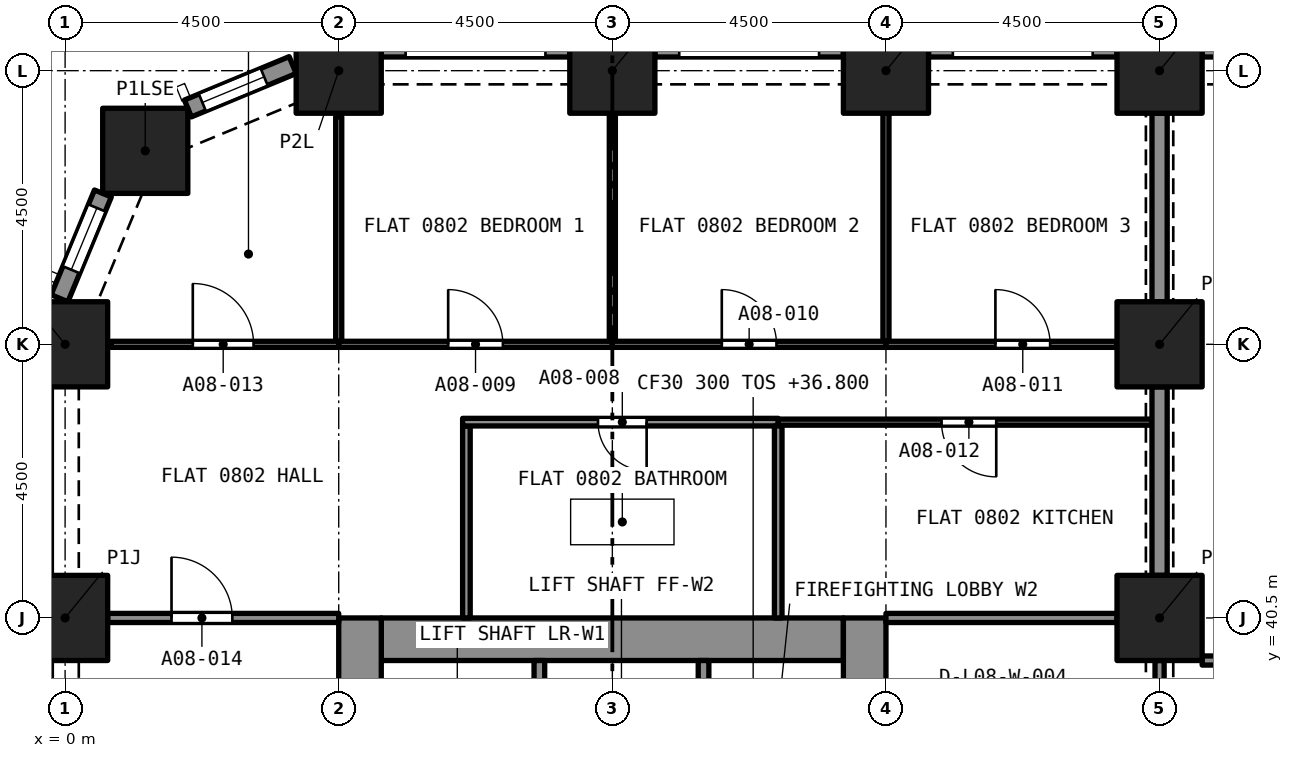
"""IFC4 building model, lengths in metres.
Left out: names, types, materials, properties, quantities, classifications, styles, units other than length and angle.
Written with IfcOpenShell. Run it as: python <this file> out.ifc"""

import sys

from ifc_helpers import new_model, si_unit, direction, frame, frame_2d, origin, origin_2d, place, context, subcontext, project, spatial, rectangle, extrude, element, fill, save


model = new_model("IFC4")
c1 = context("Model", 3, precision=1e-05, world=origin(), true_north=direction((0.0, 1.0)))
c2 = subcontext(c1, "Body", "Model", "MODEL_VIEW")
j1 = project(units=[si_unit("LENGTHUNIT", "METRE"), si_unit("PLANEANGLEUNIT", "RADIAN")], contexts=[c1])
p1 = place(None, origin())
s1 = spatial("IfcSite", under=j1, at=p1, CompositionType="ELEMENT")
p2 = place(p1, origin())
s2 = spatial("IfcBuilding", under=s1, at=p2, CompositionType="ELEMENT")
p3 = place(p2, frame((0.0, 0.0, 36.8)))
s3 = spatial("IfcBuildingStorey", under=s2, at=p3, CompositionType="ELEMENT", Elevation=36.8)
for number, where, z_axis, x_axis in (
    (1, (0.0, 40.5, 0.0), (0.0, 0.0, 1.0), (1.0, 0.0, 0.0)),
    (2, (18.0, 40.5, 0.0), (0.0, 0.0, 1.0), (1.0, 0.0, 0.0)),
    (3, (0.0, 45.0, 0.0), (0.0, 0.0, 1.0), (1.0, 0.0, 0.0)),
    (4, (18.0, 45.0, 0.0), (0.0, 0.0, 1.0), (1.0, 0.0, 0.0)),
    (5, (1.318, 48.182, 0.0), (0.0, 0.0, 1.0), (1.0, 0.0, 0.0)),
    (6, (4.5, 49.5, 0.0), (0.0, 0.0, 1.0), (1.0, 0.0, 0.0)),
    (7, (9.0, 49.5, 0.0), (0.0, 0.0, 1.0), (1.0, 0.0, 0.0)),
    (8, (13.5, 49.5, 0.0), (0.0, 0.0, 1.0), (1.0, 0.0, 0.0)),
    (9, (18.0, 49.5, 0.0), (0.0, 0.0, 1.0), (1.0, 0.0, 0.0)),
):
    element("IfcColumn", number, at=place(p3, frame(where, z_axis=z_axis, x_axis=x_axis)), inside=s3, PredefinedType="COLUMN", context=c2, shape_type="SweptSolid", body=[
        extrude(rectangle(XDim=1.4, YDim=1.4, at=origin_2d()), origin(), (0.0, 0.0, 1.0), 3.2),
    ])
p4 = place(p3, frame((5.2, 40.15, 0.0), z_axis=(0.0, 0.0, 1.0), x_axis=(1.0, 0.0, 0.0)))
e10 = element("IfcWall", 10, at=p4, inside=s3, PredefinedType="SOLIDWALL", context=c2, shape_type="SweptSolid", body=[
    extrude(rectangle(XDim=7.6, YDim=0.7, at=frame_2d((3.8, 0.0))), origin(), (0.0, 0.0, 1.0), 3.2),
])
p5 = place(p3, frame((4.85, 27.0, 0.0), z_axis=(0.0, 0.0, 1.0), x_axis=(0.0, 1.0, 0.0)))
e11 = element("IfcWall", 11, at=p5, inside=s3, PredefinedType="SOLIDWALL", context=c2, shape_type="SweptSolid", body=[
    extrude(rectangle(XDim=13.5, YDim=0.7, at=frame_2d((6.75, 0.0))), origin(), (0.0, 0.0, 1.0), 3.2),
])
p6 = place(p5, frame((8.95, 0.0, 0.0)))
e12 = element("IfcOpeningElement", 12, at=p6, cuts=e11, PredefinedType="OPENING", context=c2, shape_type="SweptSolid", body=[
    extrude(rectangle(XDim=1.2, YDim=2.1, at=frame_2d((0.6, 1.05))), frame((0.0, 0.36, 0.0), z_axis=(0.0, -1.0, 0.0), x_axis=(1.0, 0.0, 0.0)), (0.0, 0.0, 1.0), 0.72),
])
p7 = place(p3, frame((13.15, 27.0, 0.0), z_axis=(0.0, 0.0, 1.0), x_axis=(0.0, 1.0, 0.0)))
e13 = element("IfcWall", 13, at=p7, inside=s3, PredefinedType="SOLIDWALL", context=c2, shape_type="SweptSolid", body=[
    extrude(rectangle(XDim=13.5, YDim=0.7, at=frame_2d((6.75, 0.0))), origin(), (0.0, 0.0, 1.0), 3.2),
])
p8 = place(p7, frame((11.1, 0.0, 0.0)))
e14 = element("IfcOpeningElement", 14, at=p8, cuts=e13, PredefinedType="OPENING", context=c2, shape_type="SweptSolid", body=[
    extrude(rectangle(XDim=1.1, YDim=2.1, at=frame_2d((0.55, 1.05))), frame((0.0, 0.36, 0.0), z_axis=(0.0, -1.0, 0.0), x_axis=(1.0, 0.0, 0.0)), (0.0, 0.0, 1.0), 0.72),
])
p9 = place(p7, frame((8.95, 0.0, 0.0)))
e15 = element("IfcOpeningElement", 15, at=p9, cuts=e13, PredefinedType="OPENING", context=c2, shape_type="SweptSolid", body=[
    extrude(rectangle(XDim=1.2, YDim=2.1, at=frame_2d((0.6, 1.05))), frame((0.0, 0.36, 0.0), z_axis=(0.0, -1.0, 0.0), x_axis=(1.0, 0.0, 0.0)), (0.0, 0.0, 1.0), 0.72),
])
p10 = place(p3, frame((18.7, 49.875, 0.0), z_axis=(0.0, 0.0, 1.0), x_axis=(1.0, 0.0, 0.0)))
e16 = element("IfcWall", 16, at=p10, inside=s3, PredefinedType="SOLIDWALL", context=c2, shape_type="SweptSolid", body=[
    extrude(rectangle(XDim=3.1, YDim=0.3, at=frame_2d((1.55, 0.0))), origin(), (0.0, 0.0, 1.0), 3.2),
])
p11 = place(p10, frame((0.4, 0.0, 0.45)))
e17 = element("IfcOpeningElement", 17, at=p11, cuts=e16, PredefinedType="OPENING", context=c2, shape_type="SweptSolid", body=[
    extrude(rectangle(XDim=2.3, YDim=1.95, at=frame_2d((1.15, 0.975))), frame((0.0, 0.16, 0.0), z_axis=(0.0, -1.0, 0.0), x_axis=(1.0, 0.0, 0.0)), (0.0, 0.0, 1.0), 0.32),
])
p12 = place(p3, frame((14.2, 49.875, 0.0), z_axis=(0.0, 0.0, 1.0), x_axis=(1.0, 0.0, 0.0)))
e18 = element("IfcWall", 18, at=p12, inside=s3, PredefinedType="SOLIDWALL", context=c2, shape_type="SweptSolid", body=[
    extrude(rectangle(XDim=3.1, YDim=0.3, at=frame_2d((1.55, 0.0))), origin(), (0.0, 0.0, 1.0), 3.2),
])
p13 = place(p12, frame((0.4, 0.0, 0.45)))
e19 = element("IfcOpeningElement", 19, at=p13, cuts=e18, PredefinedType="OPENING", context=c2, shape_type="SweptSolid", body=[
    extrude(rectangle(XDim=2.3, YDim=1.95, at=frame_2d((1.15, 0.975))), frame((0.0, 0.16, 0.0), z_axis=(0.0, -1.0, 0.0), x_axis=(1.0, 0.0, 0.0)), (0.0, 0.0, 1.0), 0.32),
])
p14 = place(p3, frame((9.7, 49.875, 0.0), z_axis=(0.0, 0.0, 1.0), x_axis=(1.0, 0.0, 0.0)))
e20 = element("IfcWall", 20, at=p14, inside=s3, PredefinedType="SOLIDWALL", context=c2, shape_type="SweptSolid", body=[
    extrude(rectangle(XDim=3.1, YDim=0.3, at=frame_2d((1.55, 0.0))), origin(), (0.0, 0.0, 1.0), 3.2),
])
p15 = place(p14, frame((0.4, 0.0, 0.45)))
e21 = element("IfcOpeningElement", 21, at=p15, cuts=e20, PredefinedType="OPENING", context=c2, shape_type="SweptSolid", body=[
    extrude(rectangle(XDim=2.3, YDim=1.95, at=frame_2d((1.15, 0.975))), frame((0.0, 0.16, 0.0), z_axis=(0.0, -1.0, 0.0), x_axis=(1.0, 0.0, 0.0)), (0.0, 0.0, 1.0), 0.32),
])
p16 = place(p3, frame((5.2, 49.875, 0.0), z_axis=(0.0, 0.0, 1.0), x_axis=(1.0, 0.0, 0.0)))
e22 = element("IfcWall", 22, at=p16, inside=s3, PredefinedType="SOLIDWALL", context=c2, shape_type="SweptSolid", body=[
    extrude(rectangle(XDim=3.1, YDim=0.3, at=frame_2d((1.55, 0.0))), origin(), (0.0, 0.0, 1.0), 3.2),
])
p17 = place(p16, frame((0.4, 0.0, 0.45)))
e23 = element("IfcOpeningElement", 23, at=p17, cuts=e22, PredefinedType="OPENING", context=c2, shape_type="SweptSolid", body=[
    extrude(rectangle(XDim=2.3, YDim=1.95, at=frame_2d((1.15, 0.975))), frame((0.0, 0.16, 0.0), z_axis=(0.0, -1.0, 0.0), x_axis=(1.0, 0.0, 0.0)), (0.0, 0.0, 1.0), 0.32),
])
p18 = place(p3, frame((2.02, 48.878, 0.0), z_axis=(0.0, 0.0, 1.0), x_axis=(0.923903565336, 0.38262540684, 0.0)))
e24 = element("IfcWall", 24, at=p18, inside=s3, PredefinedType="SOLIDWALL", context=c2, shape_type="SweptSolid", body=[
    extrude(rectangle(XDim=1.865, YDim=0.3, at=frame_2d((0.933, 0.0))), origin(), (0.0, 0.0, 1.0), 3.2),
])
p19 = place(p18, frame((0.258, 0.0, 0.45)))
e25 = element("IfcOpeningElement", 25, at=p19, cuts=e24, PredefinedType="OPENING", context=c2, shape_type="SweptSolid", body=[
    extrude(rectangle(XDim=1.1, YDim=1.95, at=frame_2d((0.55, 0.975))), frame((0.0, 0.16, 0.0), z_axis=(0.0, -1.0, 0.0), x_axis=(1.0, 0.0, 0.0)), (0.0, 0.0, 1.0), 0.32),
])
p20 = place(p3, frame((-0.092, 45.757, 0.0), z_axis=(0.0, 0.0, 1.0), x_axis=(0.382737135771, 0.923857286003, 0.0)))
e26 = element("IfcWall", 26, at=p20, inside=s3, PredefinedType="SOLIDWALL", context=c2, shape_type="SweptSolid", body=[
    extrude(rectangle(XDim=1.865, YDim=0.3, at=frame_2d((0.933, 0.0))), origin(), (0.0, 0.0, 1.0), 3.2),
])
p21 = place(p20, frame((0.508, 0.0, 0.45)))
e27 = element("IfcOpeningElement", 27, at=p21, cuts=e26, PredefinedType="OPENING", context=c2, shape_type="SweptSolid", body=[
    extrude(rectangle(XDim=1.1, YDim=1.95, at=frame_2d((0.55, 0.975))), frame((0.0, 0.16, 0.0), z_axis=(0.0, -1.0, 0.0), x_axis=(1.0, 0.0, 0.0)), (0.0, 0.0, 1.0), 0.32),
])
p22 = place(p3, frame((6.6, 40.5, 0.0), z_axis=(0.0, 0.0, 1.0), x_axis=(0.0, 1.0, 0.0)))
e28 = element("IfcWall", 28, at=p22, inside=s3, PredefinedType="PARTITIONING", context=c2, shape_type="SweptSolid", body=[
    extrude(rectangle(XDim=3.157, YDim=0.125, at=frame_2d((1.579, 0.0))), origin(), (0.0, 0.0, 1.0), 2.9),
])
p23 = place(p3, frame((11.728, 43.72, 0.0), z_axis=(0.0, 0.0, 1.0), x_axis=(-1.0, 0.0, 0.0)))
e29 = element("IfcWall", 29, at=p23, inside=s3, PredefinedType="PARTITIONING", context=c2, shape_type="SweptSolid", body=[
    extrude(rectangle(XDim=5.19, YDim=0.125, at=frame_2d((2.595, 0.0))), origin(), (0.0, 0.0, 1.0), 2.9),
])
p24 = place(p23, frame((2.164, 0.0, 0.0)))
e30 = element("IfcOpeningElement", 30, at=p24, cuts=e29, PredefinedType="OPENING", context=c2, shape_type="SweptSolid", body=[
    extrude(rectangle(XDim=0.8, YDim=2.1, at=frame_2d((0.4, 1.05))), frame((0.0, 0.073, 0.0), z_axis=(0.0, -1.0, 0.0), x_axis=(1.0, 0.0, 0.0)), (0.0, 0.0, 1.0), 0.145),
])
p25 = place(p3, frame((11.728, 40.5, 0.0), z_axis=(0.0, 0.0, 1.0), x_axis=(0.0, 1.0, 0.0)))
e31 = element("IfcWall", 31, at=p25, inside=s3, PredefinedType="PARTITIONING", context=c2, shape_type="SweptSolid", body=[
    extrude(rectangle(XDim=3.157, YDim=0.125, at=frame_2d((1.579, 0.0))), origin(), (0.0, 0.0, 1.0), 2.9),
])
p26 = place(p3, frame((9.0, 45.05, 0.0), z_axis=(0.0, 0.0, 1.0), x_axis=(0.0, 1.0, 0.0)))
e32 = element("IfcWall", 32, at=p26, inside=s3, PredefinedType="PARTITIONING", context=c2, shape_type="SweptSolid", body=[
    extrude(rectangle(XDim=3.75, YDim=0.1, at=frame_2d((1.875, 0.0))), origin(), (0.0, 0.0, 1.0), 2.9),
])
p27 = place(p3, frame((4.5, 45.0, 0.0), z_axis=(0.0, 0.0, 1.0), x_axis=(1.0, 0.0, 0.0)))
e33 = element("IfcWall", 33, at=p27, inside=s3, PredefinedType="PARTITIONING", context=c2, shape_type="SweptSolid", body=[
    extrude(rectangle(XDim=4.5, YDim=0.1, at=frame_2d((2.25, 0.0))), origin(), (0.0, 0.0, 1.0), 2.9),
])
p28 = place(p27, frame((1.8, 0.0, 0.0)))
e34 = element("IfcOpeningElement", 34, at=p28, cuts=e33, PredefinedType="OPENING", context=c2, shape_type="SweptSolid", body=[
    extrude(rectangle(XDim=0.9, YDim=2.1, at=frame_2d((0.45, 1.05))), frame((0.0, 0.06, 0.0), z_axis=(0.0, -1.0, 0.0), x_axis=(1.0, 0.0, 0.0)), (0.0, 0.0, 1.0), 0.12),
])
p29 = place(p3, frame((4.5, 45.05, 0.0), z_axis=(0.0, 0.0, 1.0), x_axis=(0.0, 1.0, 0.0)))
e35 = element("IfcWall", 35, at=p29, inside=s3, PredefinedType="PARTITIONING", context=c2, shape_type="SweptSolid", body=[
    extrude(rectangle(XDim=3.692, YDim=0.1, at=frame_2d((1.846, 0.0))), origin(), (0.0, 0.0, 1.0), 2.9),
])
p30 = place(p3, frame((13.5, 45.05, 0.0), z_axis=(0.0, 0.0, 1.0), x_axis=(0.0, 1.0, 0.0)))
e36 = element("IfcWall", 36, at=p30, inside=s3, PredefinedType="PARTITIONING", context=c2, shape_type="SweptSolid", body=[
    extrude(rectangle(XDim=3.75, YDim=0.1, at=frame_2d((1.875, 0.0))), origin(), (0.0, 0.0, 1.0), 2.9),
])
p31 = place(p3, frame((9.0, 45.0, 0.0), z_axis=(0.0, 0.0, 1.0), x_axis=(1.0, 0.0, 0.0)))
e37 = element("IfcWall", 37, at=p31, inside=s3, PredefinedType="PARTITIONING", context=c2, shape_type="SweptSolid", body=[
    extrude(rectangle(XDim=4.5, YDim=0.1, at=frame_2d((2.25, 0.0))), origin(), (0.0, 0.0, 1.0), 2.9),
])
p32 = place(p31, frame((1.8, 0.0, 0.0)))
e38 = element("IfcOpeningElement", 38, at=p32, cuts=e37, PredefinedType="OPENING", context=c2, shape_type="SweptSolid", body=[
    extrude(rectangle(XDim=0.9, YDim=2.1, at=frame_2d((0.45, 1.05))), frame((0.0, 0.06, 0.0), z_axis=(0.0, -1.0, 0.0), x_axis=(1.0, 0.0, 0.0)), (0.0, 0.0, 1.0), 0.12),
])
p33 = place(p3, frame((13.5, 45.0, 0.0), z_axis=(0.0, 0.0, 1.0), x_axis=(1.0, 0.0, 0.0)))
e39 = element("IfcWall", 39, at=p33, inside=s3, PredefinedType="PARTITIONING", context=c2, shape_type="SweptSolid", body=[
    extrude(rectangle(XDim=3.8, YDim=0.1, at=frame_2d((1.9, 0.0))), origin(), (0.0, 0.0, 1.0), 2.9),
])
p34 = place(p33, frame((1.8, 0.0, 0.0)))
e40 = element("IfcOpeningElement", 40, at=p34, cuts=e39, PredefinedType="OPENING", context=c2, shape_type="SweptSolid", body=[
    extrude(rectangle(XDim=0.9, YDim=2.1, at=frame_2d((0.45, 1.05))), frame((0.0, 0.06, 0.0), z_axis=(0.0, -1.0, 0.0), x_axis=(1.0, 0.0, 0.0)), (0.0, 0.0, 1.0), 0.12),
])
p35 = place(p3, frame((18.0, 45.7, 0.0), z_axis=(0.0, 0.0, 1.0), x_axis=(0.0, 1.0, 0.0)))
e41 = element("IfcWall", 41, at=p35, inside=s3, PredefinedType="PARTITIONING", context=c2, shape_type="SweptSolid", body=[
    extrude(rectangle(XDim=3.1, YDim=0.25, at=frame_2d((1.55, 0.0))), origin(), (0.0, 0.0, 1.0), 2.38),
])
p36 = place(p3, frame((17.875, 43.72, 0.0), z_axis=(0.0, 0.0, 1.0), x_axis=(-1.0, 0.0, 0.0)))
e42 = element("IfcWall", 42, at=p36, inside=s3, PredefinedType="PARTITIONING", context=c2, shape_type="SweptSolid", body=[
    extrude(rectangle(XDim=6.147, YDim=0.1, at=frame_2d((3.073, 0.0))), origin(), (0.0, 0.0, 1.0), 2.9),
])
p37 = place(p36, frame((2.561, 0.0, 0.0)))
e43 = element("IfcOpeningElement", 43, at=p37, cuts=e42, PredefinedType="OPENING", context=c2, shape_type="SweptSolid", body=[
    extrude(rectangle(XDim=0.9, YDim=2.1, at=frame_2d((0.45, 1.05))), frame((0.0, 0.06, 0.0), z_axis=(0.0, -1.0, 0.0), x_axis=(1.0, 0.0, 0.0)), (0.0, 0.0, 1.0), 0.12),
])
p38 = place(p3, frame((0.758, 45.0, 0.0), z_axis=(0.0, 0.0, 1.0), x_axis=(1.0, 0.0, 0.0)))
e44 = element("IfcWall", 44, at=p38, inside=s3, PredefinedType="PARTITIONING", context=c2, shape_type="SweptSolid", body=[
    extrude(rectangle(XDim=3.742, YDim=0.1, at=frame_2d((1.871, 0.0))), origin(), (0.0, 0.0, 1.0), 2.9),
])
p39 = place(p38, frame((1.342, 0.0, 0.0)))
e45 = element("IfcOpeningElement", 45, at=p39, cuts=e44, PredefinedType="OPENING", context=c2, shape_type="SweptSolid", body=[
    extrude(rectangle(XDim=1.0, YDim=2.1, at=frame_2d((0.5, 1.05))), frame((0.0, 0.06, 0.0), z_axis=(0.0, -1.0, 0.0), x_axis=(1.0, 0.0, 0.0)), (0.0, 0.0, 1.0), 0.12),
])
p40 = place(p3, frame((0.7, 40.5, 0.0), z_axis=(0.0, 0.0, 1.0), x_axis=(1.0, 0.0, 0.0)))
e46 = element("IfcWall", 46, at=p40, inside=s3, PredefinedType="PARTITIONING", context=c2, shape_type="SweptSolid", body=[
    extrude(rectangle(XDim=3.8, YDim=0.15, at=frame_2d((1.9, 0.0))), origin(), (0.0, 0.0, 1.0), 2.9),
])
p41 = place(p40, frame((1.05, 0.0, 0.0)))
e47 = element("IfcOpeningElement", 47, at=p41, cuts=e46, PredefinedType="OPENING", context=c2, shape_type="SweptSolid", body=[
    extrude(rectangle(XDim=1.0, YDim=2.1, at=frame_2d((0.5, 1.05))), frame((0.0, 0.085, 0.0), z_axis=(0.0, -1.0, 0.0), x_axis=(1.0, 0.0, 0.0)), (0.0, 0.0, 1.0), 0.17),
])
p42 = place(p3, frame((18.0, 41.2, 0.0), z_axis=(0.0, 0.0, 1.0), x_axis=(0.0, 1.0, 0.0)))
e48 = element("IfcWall", 48, at=p42, inside=s3, PredefinedType="PARTITIONING", context=c2, shape_type="SweptSolid", body=[
    extrude(rectangle(XDim=3.1, YDim=0.25, at=frame_2d((1.55, 0.0))), origin(), (0.0, 0.0, 1.0), 2.38),
])
p43 = place(p3, frame((13.5, 40.5, 0.0), z_axis=(0.0, 0.0, 1.0), x_axis=(1.0, 0.0, 0.0)))
e49 = element("IfcWall", 49, at=p43, inside=s3, PredefinedType="PARTITIONING", context=c2, shape_type="SweptSolid", body=[
    extrude(rectangle(XDim=3.8, YDim=0.15, at=frame_2d((1.9, 0.0))), origin(), (0.0, 0.0, 1.0), 2.9),
])
p44 = place(p3, frame((18.7, 39.8, 0.0), z_axis=(0.0, 0.0, 1.0), x_axis=(1.0, 0.0, 0.0)))
e50 = element("IfcWall", 50, at=p44, inside=s3, PredefinedType="PARTITIONING", context=c2, shape_type="SweptSolid", body=[
    extrude(rectangle(XDim=12.1, YDim=0.15, at=frame_2d((6.05, 0.0))), origin(), (0.0, 0.0, 1.0), 2.75),
])
p45 = place(p44, frame((5.55, 0.0, 0.0)))
e51 = element("IfcOpeningElement", 51, at=p45, cuts=e50, PredefinedType="OPENING", context=c2, shape_type="SweptSolid", body=[
    extrude(rectangle(XDim=1.0, YDim=2.1, at=frame_2d((0.5, 1.05))), frame((0.0, 0.085, 0.0), z_axis=(0.0, -1.0, 0.0), x_axis=(1.0, 0.0, 0.0)), (0.0, 0.0, 1.0), 0.17),
])
p46 = place(p3, frame((18.0, 39.8, 0.0), z_axis=(0.0, 0.0, 1.0), x_axis=(0.0, -1.0, 0.0)))
e52 = element("IfcWall", 52, at=p46, inside=s3, PredefinedType="PARTITIONING", context=c2, shape_type="SweptSolid", body=[
    extrude(rectangle(XDim=3.1, YDim=0.15, at=frame_2d((1.55, 0.0))), origin(), (0.0, 0.0, 1.0), 2.38),
])
p47 = place(p46, frame((0.95, 0.0, 0.0)))
e53 = element("IfcOpeningElement", 53, at=p47, cuts=e52, PredefinedType="OPENING", context=c2, shape_type="SweptSolid", body=[
    extrude(rectangle(XDim=1.2, YDim=2.1, at=frame_2d((0.6, 1.05))), frame((0.0, 0.085, 0.0), z_axis=(0.0, -1.0, 0.0), x_axis=(1.0, 0.0, 0.0)), (0.0, 0.0, 1.0), 0.17),
])
p48 = place(p3, frame((7.8, 37.5, 0.0), z_axis=(0.0, 0.0, 1.0), x_axis=(0.0, 1.0, 0.0)))
e54 = element("IfcWall", 54, at=p48, inside=s3, PredefinedType="SOLIDWALL", context=c2, shape_type="SweptSolid", body=[
    extrude(rectangle(XDim=2.3, YDim=0.175, at=frame_2d((1.15, 0.0))), origin(), (0.0, 0.0, 1.0), 2.9),
])
p49 = place(p3, frame((10.5, 37.5, 0.0), z_axis=(0.0, 0.0, 1.0), x_axis=(0.0, 1.0, 0.0)))
e55 = element("IfcWall", 55, at=p49, inside=s3, PredefinedType="SOLIDWALL", context=c2, shape_type="SweptSolid", body=[
    extrude(rectangle(XDim=2.3, YDim=0.175, at=frame_2d((1.15, 0.0))), origin(), (0.0, 0.0, 1.0), 2.9),
])
p50 = place(p49, frame((0.65, 0.0, 0.0)))
e56 = element("IfcOpeningElement", 56, at=p50, cuts=e55, PredefinedType="OPENING", context=c2, shape_type="SweptSolid", body=[
    extrude(rectangle(XDim=1.0, YDim=2.1, at=frame_2d((0.5, 1.05))), frame((0.0, 0.097, 0.0), z_axis=(0.0, -1.0, 0.0), x_axis=(1.0, 0.0, 0.0)), (0.0, 0.0, 1.0), 0.195),
])
p51 = place(p19, origin())
e57 = element("IfcWindow", 57, at=p51, inside=s3, PartitioningType="SINGLE_PANEL", PredefinedType="WINDOW", context=c2, shape_type="SweptSolid", body=[
    extrude(rectangle(XDim=1.1, YDim=1.95, at=frame_2d((0.55, 0.975))), frame((0.0, 0.03, 0.0), z_axis=(0.0, -1.0, 0.0), x_axis=(1.0, 0.0, 0.0)), (0.0, 0.0, 1.0), 0.06),
])
fill(e25, e57)
p52 = place(p21, origin())
e58 = element("IfcWindow", 58, at=p52, inside=s3, PartitioningType="SINGLE_PANEL", PredefinedType="WINDOW", context=c2, shape_type="SweptSolid", body=[
    extrude(rectangle(XDim=1.1, YDim=1.95, at=frame_2d((0.55, 0.975))), frame((0.0, 0.03, 0.0), z_axis=(0.0, -1.0, 0.0), x_axis=(1.0, 0.0, 0.0)), (0.0, 0.0, 1.0), 0.06),
])
fill(e27, e58)
p53 = place(p24, origin())
e59 = element("IfcDoor", 59, at=p53, inside=s3, OperationType="SINGLE_SWING_LEFT", PredefinedType="DOOR", context=c2, shape_type="SweptSolid", body=[
    extrude(rectangle(XDim=0.8, YDim=2.1, at=frame_2d((0.4, 1.05))), frame((0.0, 0.025, 0.0), z_axis=(0.0, -1.0, 0.0), x_axis=(1.0, 0.0, 0.0)), (0.0, 0.0, 1.0), 0.05),
])
fill(e30, e59)
p54 = place(p28, origin())
e60 = element("IfcDoor", 60, at=p54, inside=s3, OperationType="SINGLE_SWING_RIGHT", PredefinedType="DOOR", context=c2, shape_type="SweptSolid", body=[
    extrude(rectangle(XDim=0.9, YDim=2.1, at=frame_2d((0.45, 1.05))), frame((0.0, 0.025, 0.0), z_axis=(0.0, -1.0, 0.0), x_axis=(1.0, 0.0, 0.0)), (0.0, 0.0, 1.0), 0.05),
])
fill(e34, e60)
p55 = place(p32, origin())
e61 = element("IfcDoor", 61, at=p55, inside=s3, OperationType="SINGLE_SWING_LEFT", PredefinedType="DOOR", context=c2, shape_type="SweptSolid", body=[
    extrude(rectangle(XDim=0.9, YDim=2.1, at=frame_2d((0.45, 1.05))), frame((0.0, 0.025, 0.0), z_axis=(0.0, -1.0, 0.0), x_axis=(1.0, 0.0, 0.0)), (0.0, 0.0, 1.0), 0.05),
])
fill(e38, e61)
p56 = place(p34, origin())
e62 = element("IfcDoor", 62, at=p56, inside=s3, OperationType="SINGLE_SWING_RIGHT", PredefinedType="DOOR", context=c2, shape_type="SweptSolid", body=[
    extrude(rectangle(XDim=0.9, YDim=2.1, at=frame_2d((0.45, 1.05))), frame((0.0, 0.025, 0.0), z_axis=(0.0, -1.0, 0.0), x_axis=(1.0, 0.0, 0.0)), (0.0, 0.0, 1.0), 0.05),
])
fill(e40, e62)
p57 = place(p37, origin())
e63 = element("IfcDoor", 63, at=p57, inside=s3, OperationType="SINGLE_SWING_LEFT", PredefinedType="DOOR", context=c2, shape_type="SweptSolid", body=[
    extrude(rectangle(XDim=0.9, YDim=2.1, at=frame_2d((0.45, 1.05))), frame((0.0, 0.025, 0.0), z_axis=(0.0, -1.0, 0.0), x_axis=(1.0, 0.0, 0.0)), (0.0, 0.0, 1.0), 0.05),
])
fill(e43, e63)
p58 = place(p39, origin())
e64 = element("IfcDoor", 64, at=p58, inside=s3, OperationType="SINGLE_SWING_LEFT", PredefinedType="DOOR", context=c2, shape_type="SweptSolid", body=[
    extrude(rectangle(XDim=1.0, YDim=2.1, at=frame_2d((0.5, 1.05))), frame((0.0, 0.025, 0.0), z_axis=(0.0, -1.0, 0.0), x_axis=(1.0, 0.0, 0.0)), (0.0, 0.0, 1.0), 0.05),
])
fill(e45, e64)
p59 = place(p41, origin())
e65 = element("IfcDoor", 65, at=p59, inside=s3, OperationType="SINGLE_SWING_LEFT", PredefinedType="DOOR", context=c2, shape_type="SweptSolid", body=[
    extrude(rectangle(XDim=1.0, YDim=2.1, at=frame_2d((0.5, 1.05))), frame((0.0, 0.025, 0.0), z_axis=(0.0, -1.0, 0.0), x_axis=(1.0, 0.0, 0.0)), (0.0, 0.0, 1.0), 0.05),
])
fill(e47, e65)
save(model, sys.argv[1])
